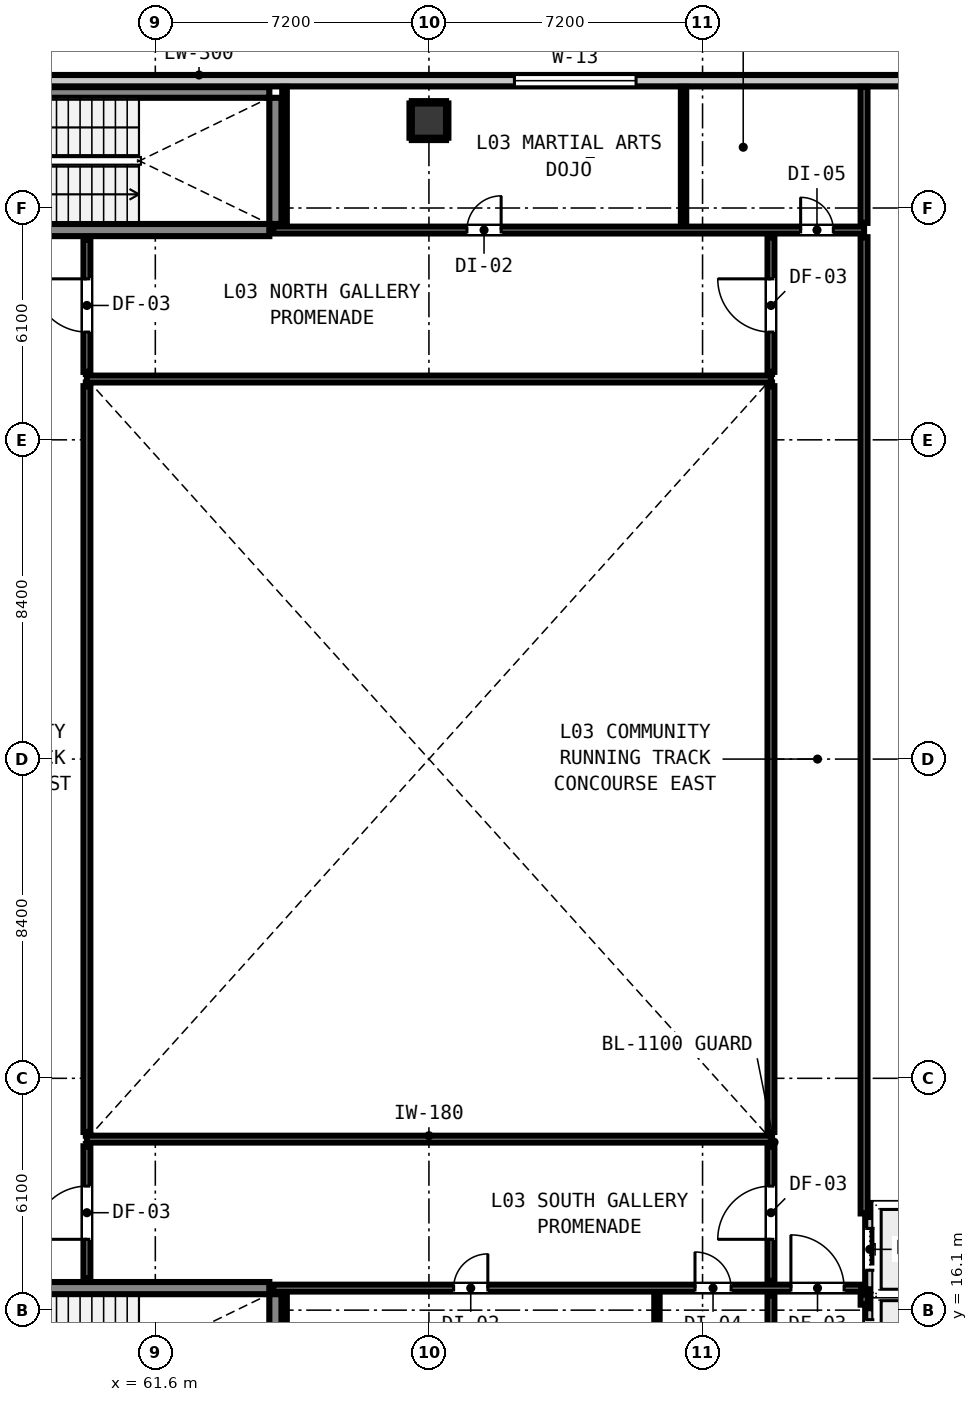
"""IFC4 building model, lengths in metres.
Left out: names, types, materials, properties, quantities, classifications, styles, units other than length and angle.
Written with IfcOpenShell. Run it as: python <this file> out.ifc"""

import sys

from ifc_helpers import new_model, si_unit, direction, frame, frame_2d, origin, origin_2d, place, context, subcontext, project, spatial, rectangle, circle, extrude, element, fill, save


model = new_model("IFC4")
c1 = context("Model", 3, precision=1e-05, world=origin(), true_north=direction((0.0, 1.0)))
c2 = subcontext(c1, "Body", "Model", "MODEL_VIEW")
j1 = project(units=[si_unit("LENGTHUNIT", "METRE"), si_unit("PLANEANGLEUNIT", "RADIAN")], contexts=[c1])
p1 = place(None, origin())
s1 = spatial("IfcSite", under=j1, at=p1, CompositionType="ELEMENT")
p2 = place(p1, origin())
s2 = spatial("IfcBuilding", under=s1, at=p2, CompositionType="ELEMENT")
p3 = place(p2, frame((0.0, 0.0, 13.6)))
s3 = spatial("IfcBuildingStorey", under=s2, at=p3, CompositionType="ELEMENT", Elevation=13.6)
p4 = place(p3, frame((64.76, 13.2, 0.0), z_axis=(0.0, 0.0, 1.0), x_axis=(0.0, 1.0, 0.0)))
e1 = element("IfcWall", 1, at=p4, inside=s3, PredefinedType="SHEAR", context=c2, shape_type="SweptSolid", body=[
    extrude(rectangle(XDim=3.32, YDim=0.32, at=frame_2d((1.66, 0.0))), origin(), (0.0, 0.0, 1.0), 4.2),
])
p5 = place(p3, frame((56.2, 16.68, 0.0), z_axis=(0.0, 0.0, 1.0), x_axis=(1.0, 0.0, 0.0)))
e2 = element("IfcWall", 2, at=p5, inside=s3, PredefinedType="SHEAR", context=c2, shape_type="SweptSolid", body=[
    extrude(rectangle(XDim=8.4, YDim=0.32, at=frame_2d((4.2, 0.0))), origin(), (0.0, 0.0, 1.0), 4.2),
])
p6 = place(p5, frame((0.23, 0.0, 0.0)))
e3 = element("IfcOpeningElement", 3, at=p6, cuts=e2, PredefinedType="OPENING", context=c2, shape_type="SweptSolid", body=[
    extrude(rectangle(XDim=1.1, YDim=2.15, at=frame_2d((0.55, 1.075))), frame((0.0, 0.17, 0.0), z_axis=(0.0, -1.0, 0.0), x_axis=(1.0, 0.0, 0.0)), (0.0, 0.0, 1.0), 0.34),
])
p7 = place(p3, frame((64.76, 44.68, 0.0), z_axis=(0.0, 0.0, 1.0), x_axis=(0.0, 1.0, 0.0)))
e4 = element("IfcWall", 4, at=p7, inside=s3, PredefinedType="SHEAR", context=c2, shape_type="SweptSolid", body=[
    extrude(rectangle(XDim=3.32, YDim=0.32, at=frame_2d((1.66, 0.0))), origin(), (0.0, 0.0, 1.0), 4.2),
])
p8 = place(p3, frame((56.2, 48.14, 0.0), z_axis=(0.0, 0.0, 1.0), x_axis=(1.0, 0.0, 0.0)))
e5 = element("IfcWall", 5, at=p8, inside=s3, PredefinedType="SHEAR", context=c2, shape_type="SweptSolid", body=[
    extrude(rectangle(XDim=8.4, YDim=0.28, at=frame_2d((4.2, 0.0))), origin(), (0.0, 0.0, 1.0), 4.2),
])
p9 = place(p3, frame((56.2, 44.52, 0.0), z_axis=(0.0, 0.0, 1.0), x_axis=(1.0, 0.0, 0.0)))
e6 = element("IfcWall", 6, at=p9, inside=s3, PredefinedType="SHEAR", context=c2, shape_type="SweptSolid", body=[
    extrude(rectangle(XDim=8.4, YDim=0.32, at=frame_2d((4.2, 0.0))), origin(), (0.0, 0.0, 1.0), 4.2),
])
p10 = place(p9, frame((0.23, 0.0, 0.0)))
e7 = element("IfcOpeningElement", 7, at=p10, cuts=e6, PredefinedType="OPENING", context=c2, shape_type="SweptSolid", body=[
    extrude(rectangle(XDim=1.1, YDim=2.15, at=frame_2d((0.55, 1.075))), frame((0.0, 0.17, 0.0), z_axis=(0.0, -1.0, 0.0), x_axis=(1.0, 0.0, 0.0)), (0.0, 0.0, 1.0), 0.34),
])
p11 = place(p3, frame((68.8, 47.4, 0.0), z_axis=(0.0, 0.0, 1.0), x_axis=(1.0, 0.0, 0.0)))
e8 = element("IfcColumn", 8, at=p11, inside=s3, PredefinedType="COLUMN", context=c2, shape_type="SweptSolid", body=[
    extrude(circle(Radius=0.45, at=origin_2d()), origin(), (0.0, 0.0, 1.0), 4.2),
])
p12 = place(p3, frame((54.55, 48.45, 0.0), z_axis=(0.0, 0.0, 1.0), x_axis=(1.0, 0.0, 0.0)))
e9 = element("IfcWall", 9, at=p12, inside=s3, PredefinedType="STANDARD", context=c2, shape_type="SweptSolid", body=[
    extrude(rectangle(XDim=28.5, YDim=0.3, at=frame_2d((14.25, 0.0))), origin(), (0.0, 0.0, 1.0), 3.92),
])
p13 = place(p12, frame((16.5, 0.0, 1.6)))
e10 = element("IfcOpeningElement", 10, at=p13, cuts=e9, PredefinedType="OPENING", context=c2, shape_type="SweptSolid", body=[
    extrude(rectangle(XDim=3.2, YDim=1.4, at=frame_2d((1.6, 0.7))), frame((0.0, 0.16, 0.0), z_axis=(0.0, -1.0, 0.0), x_axis=(1.0, 0.0, 0.0)), (0.0, 0.0, 1.0), 0.32),
])
p14 = place(p3, frame((80.4, 16.4, 0.0), z_axis=(0.0, 0.0, 1.0), x_axis=(1.0, 0.0, 0.0)))
e11 = element("IfcWall", 11, at=p14, inside=s3, PredefinedType="PARTITIONING", context=c2, shape_type="SweptSolid", body=[
    extrude(rectangle(XDim=2.2, YDim=0.24, at=frame_2d((1.1, 0.0))), origin(), (0.0, 0.0, 1.0), 3.78),
])
p15 = place(p3, frame((80.4, 14.448, 0.0), z_axis=(0.0, 0.0, 1.0), x_axis=(0.0, 1.0, 0.0)))
e12 = element("IfcWall", 12, at=p15, inside=s3, PredefinedType="PARTITIONING", context=c2, shape_type="SweptSolid", body=[
    extrude(rectangle(XDim=1.704, YDim=0.24, at=frame_2d((0.852, 0.0))), origin(), (0.0, 0.0, 1.0), 3.78),
])
p16 = place(p15, frame((0.302, 0.0, 0.0)))
e13 = element("IfcOpeningElement", 13, at=p16, cuts=e12, PredefinedType="OPENING", context=c2, shape_type="SweptSolid", body=[
    extrude(rectangle(XDim=1.1, YDim=2.15, at=frame_2d((0.55, 1.075))), frame((0.0, 0.13, 0.0), z_axis=(0.0, -1.0, 0.0), x_axis=(1.0, 0.0, 0.0)), (0.0, 0.0, 1.0), 0.26),
])
p17 = place(p3, frame((80.4, 18.8, 0.0), z_axis=(0.0, 0.0, 1.0), x_axis=(1.0, 0.0, 0.0)))
e14 = element("IfcWall", 14, at=p17, inside=s3, PredefinedType="PARTITIONING", context=c2, shape_type="SweptSolid", body=[
    extrude(rectangle(XDim=2.2, YDim=0.24, at=frame_2d((1.1, 0.0))), origin(), (0.0, 0.0, 1.0), 3.78),
])
p18 = place(p3, frame((80.4, 16.648, 0.0), z_axis=(0.0, 0.0, 1.0), x_axis=(0.0, 1.0, 0.0)))
e15 = element("IfcWall", 15, at=p18, inside=s3, PredefinedType="PARTITIONING", context=c2, shape_type="SweptSolid", body=[
    extrude(rectangle(XDim=1.904, YDim=0.24, at=frame_2d((0.952, 0.0))), origin(), (0.0, 0.0, 1.0), 3.78),
])
p19 = place(p18, frame((0.502, 0.0, 0.0)))
e16 = element("IfcOpeningElement", 16, at=p19, cuts=e15, PredefinedType="OPENING", context=c2, shape_type="SweptSolid", body=[
    extrude(rectangle(XDim=1.1, YDim=2.15, at=frame_2d((0.55, 1.075))), frame((0.0, 0.13, 0.0), z_axis=(0.0, -1.0, 0.0), x_axis=(1.0, 0.0, 0.0)), (0.0, 0.0, 1.0), 0.26),
])
p20 = place(p3, frame((64.7, 16.68, 0.0), z_axis=(0.0, 0.0, 1.0), x_axis=(1.0, 0.0, 0.0)))
e17 = element("IfcWall", 17, at=p20, inside=s3, PredefinedType="PARTITIONING", context=c2, shape_type="SweptSolid", body=[
    extrude(rectangle(XDim=15.482, YDim=0.18, at=frame_2d((7.741, 0.0))), origin(), (0.0, 0.0, 1.0), 3.78),
])
p21 = place(p20, frame((13.625, 0.0, 0.0)))
e18 = element("IfcOpeningElement", 18, at=p21, cuts=e17, PredefinedType="OPENING", context=c2, shape_type="SweptSolid", body=[
    extrude(rectangle(XDim=1.4, YDim=2.15, at=frame_2d((0.7, 1.075))), frame((0.0, 0.1, 0.0), z_axis=(0.0, -1.0, 0.0), x_axis=(1.0, 0.0, 0.0)), (0.0, 0.0, 1.0), 0.2),
])
p22 = place(p20, frame((4.75, 0.0, 0.0)))
e19 = element("IfcOpeningElement", 19, at=p22, cuts=e17, PredefinedType="OPENING", context=c2, shape_type="SweptSolid", body=[
    extrude(rectangle(XDim=0.9, YDim=2.1, at=frame_2d((0.45, 1.05))), frame((0.0, 0.1, 0.0), z_axis=(0.0, -1.0, 0.0), x_axis=(1.0, 0.0, 0.0)), (0.0, 0.0, 1.0), 0.2),
])
p23 = place(p20, frame((11.101, 0.0, 0.0)))
e20 = element("IfcOpeningElement", 20, at=p23, cuts=e17, PredefinedType="OPENING", context=c2, shape_type="SweptSolid", body=[
    extrude(rectangle(XDim=0.95, YDim=2.1, at=frame_2d((0.475, 1.05))), frame((0.0, 0.1, 0.0), z_axis=(0.0, -1.0, 0.0), x_axis=(1.0, 0.0, 0.0)), (0.0, 0.0, 1.0), 0.2),
])
for number, where, z_axis, x_axis in (
    (21, (59.8, 20.6, 0.0), (0.0, 0.0, 1.0), (1.0, 0.0, 0.0)),
    (22, (59.8, 40.6, 0.0), (0.0, 0.0, 1.0), (1.0, 0.0, 0.0)),
):
    element("IfcWall", number, at=place(p3, frame(where, z_axis=z_axis, x_axis=x_axis)), inside=s3, PredefinedType="PARTITIONING", context=c2, shape_type="SweptSolid", body=[
        extrude(rectangle(XDim=18.0, YDim=0.18, at=frame_2d((9.0, 0.0))), origin(), (0.0, 0.0, 1.0), 3.78),
    ])
p24 = place(p3, frame((64.7, 44.52, 0.0), z_axis=(0.0, 0.0, 1.0), x_axis=(1.0, 0.0, 0.0)))
e23 = element("IfcWall", 23, at=p24, inside=s3, PredefinedType="PARTITIONING", context=c2, shape_type="SweptSolid", body=[
    extrude(rectangle(XDim=15.55, YDim=0.18, at=frame_2d((7.775, 0.0))), origin(), (0.0, 0.0, 1.0), 3.78),
])
p25 = place(p24, frame((5.1, 0.0, 0.0)))
e24 = element("IfcOpeningElement", 24, at=p25, cuts=e23, PredefinedType="OPENING", context=c2, shape_type="SweptSolid", body=[
    extrude(rectangle(XDim=0.9, YDim=2.1, at=frame_2d((0.45, 1.05))), frame((0.0, 0.1, 0.0), z_axis=(0.0, -1.0, 0.0), x_axis=(1.0, 0.0, 0.0)), (0.0, 0.0, 1.0), 0.2),
])
p26 = place(p24, frame((13.881, 0.0, 0.0)))
e25 = element("IfcOpeningElement", 25, at=p26, cuts=e23, PredefinedType="OPENING", context=c2, shape_type="SweptSolid", body=[
    extrude(rectangle(XDim=0.86, YDim=2.02, at=frame_2d((0.43, 1.01))), frame((0.0, 0.1, 0.0), z_axis=(0.0, -1.0, 0.0), x_axis=(1.0, 0.0, 0.0)), (0.0, 0.0, 1.0), 0.2),
])
p27 = place(p3, frame((59.8, 16.94, 0.0), z_axis=(0.0, 0.0, 1.0), x_axis=(0.0, 1.0, 0.0)))
e26 = element("IfcWall", 26, at=p27, inside=s3, PredefinedType="PARTITIONING", context=c2, shape_type="SweptSolid", body=[
    extrude(rectangle(XDim=3.472, YDim=0.18, at=frame_2d((1.736, 0.0))), origin(), (0.0, 0.0, 1.0), 3.78),
])
p28 = place(p27, frame((1.024, 0.0, 0.0)))
e27 = element("IfcOpeningElement", 27, at=p28, cuts=e26, PredefinedType="OPENING", context=c2, shape_type="SweptSolid", body=[
    extrude(rectangle(XDim=1.4, YDim=2.15, at=frame_2d((0.7, 1.075))), frame((0.0, 0.1, 0.0), z_axis=(0.0, -1.0, 0.0), x_axis=(1.0, 0.0, 0.0)), (0.0, 0.0, 1.0), 0.2),
])
p29 = place(p3, frame((59.8, 20.788, 0.0), z_axis=(0.0, 0.0, 1.0), x_axis=(0.0, 1.0, 0.0)))
e28 = element("IfcWall", 28, at=p29, inside=s3, PredefinedType="PARTITIONING", context=c2, shape_type="SweptSolid", body=[
    extrude(rectangle(XDim=19.624, YDim=0.18, at=frame_2d((9.812, 0.0))), origin(), (0.0, 0.0, 1.0), 3.78),
])
p30 = place(p3, frame((59.8, 40.788, 0.0), z_axis=(0.0, 0.0, 1.0), x_axis=(0.0, 1.0, 0.0)))
e29 = element("IfcWall", 29, at=p30, inside=s3, PredefinedType="PARTITIONING", context=c2, shape_type="SweptSolid", body=[
    extrude(rectangle(XDim=3.472, YDim=0.18, at=frame_2d((1.736, 0.0))), origin(), (0.0, 0.0, 1.0), 3.78),
])
p31 = place(p30, frame((1.048, 0.0, 0.0)))
e30 = element("IfcOpeningElement", 30, at=p31, cuts=e29, PredefinedType="OPENING", context=c2, shape_type="SweptSolid", body=[
    extrude(rectangle(XDim=1.4, YDim=2.15, at=frame_2d((0.7, 1.075))), frame((0.0, 0.1, 0.0), z_axis=(0.0, -1.0, 0.0), x_axis=(1.0, 0.0, 0.0)), (0.0, 0.0, 1.0), 0.2),
])
p32 = place(p3, frame((77.8, 12.912, 0.0), z_axis=(0.0, 0.0, 1.0), x_axis=(0.0, 1.0, 0.0)))
e31 = element("IfcWall", 31, at=p32, inside=s3, PredefinedType="PARTITIONING", context=c2, shape_type="SweptSolid", body=[
    extrude(rectangle(XDim=3.58, YDim=0.18, at=frame_2d((1.79, 0.0))), origin(), (0.0, 0.0, 1.0), 3.78),
])
p33 = place(p3, frame((77.8, 16.868, 0.0), z_axis=(0.0, 0.0, 1.0), x_axis=(0.0, 1.0, 0.0)))
e32 = element("IfcWall", 32, at=p33, inside=s3, PredefinedType="PARTITIONING", context=c2, shape_type="SweptSolid", body=[
    extrude(rectangle(XDim=3.544, YDim=0.18, at=frame_2d((1.772, 0.0))), origin(), (0.0, 0.0, 1.0), 3.78),
])
p34 = place(p33, frame((1.096, 0.0, 0.0)))
e33 = element("IfcOpeningElement", 33, at=p34, cuts=e32, PredefinedType="OPENING", context=c2, shape_type="SweptSolid", body=[
    extrude(rectangle(XDim=1.4, YDim=2.15, at=frame_2d((0.7, 1.075))), frame((0.0, 0.1, 0.0), z_axis=(0.0, -1.0, 0.0), x_axis=(1.0, 0.0, 0.0)), (0.0, 0.0, 1.0), 0.2),
])
p35 = place(p3, frame((77.8, 20.788, 0.0), z_axis=(0.0, 0.0, 1.0), x_axis=(0.0, 1.0, 0.0)))
e34 = element("IfcWall", 34, at=p35, inside=s3, PredefinedType="PARTITIONING", context=c2, shape_type="SweptSolid", body=[
    extrude(rectangle(XDim=19.624, YDim=0.18, at=frame_2d((9.812, 0.0))), origin(), (0.0, 0.0, 1.0), 3.78),
])
p36 = place(p3, frame((77.8, 40.788, 0.0), z_axis=(0.0, 0.0, 1.0), x_axis=(0.0, 1.0, 0.0)))
e35 = element("IfcWall", 35, at=p36, inside=s3, PredefinedType="PARTITIONING", context=c2, shape_type="SweptSolid", body=[
    extrude(rectangle(XDim=3.544, YDim=0.18, at=frame_2d((1.772, 0.0))), origin(), (0.0, 0.0, 1.0), 3.78),
])
p37 = place(p36, frame((1.048, 0.0, 0.0)))
e36 = element("IfcOpeningElement", 36, at=p37, cuts=e35, PredefinedType="OPENING", context=c2, shape_type="SweptSolid", body=[
    extrude(rectangle(XDim=1.4, YDim=2.15, at=frame_2d((0.7, 1.075))), frame((0.0, 0.1, 0.0), z_axis=(0.0, -1.0, 0.0), x_axis=(1.0, 0.0, 0.0)), (0.0, 0.0, 1.0), 0.2),
])
p38 = place(p3, frame((80.25, 16.245, 0.0), z_axis=(0.0, 0.0, 1.0), x_axis=(0.0, 1.0, 0.0)))
e37 = element("IfcWall", 37, at=p38, inside=s3, PredefinedType="PARTITIONING", context=c2, shape_type="SweptSolid", body=[
    extrude(rectangle(XDim=0.275, YDim=0.18, at=frame_2d((0.137, 0.0))), origin(), (0.0, 0.0, 1.0), 3.78),
])
p39 = place(p3, frame((80.25, 18.645, 0.0), z_axis=(0.0, 0.0, 1.0), x_axis=(0.0, 1.0, 0.0)))
e38 = element("IfcWall", 38, at=p39, inside=s3, PredefinedType="PARTITIONING", context=c2, shape_type="SweptSolid", body=[
    extrude(rectangle(XDim=25.687, YDim=0.18, at=frame_2d((12.844, 0.0))), origin(), (0.0, 0.0, 1.0), 3.78),
])
p40 = place(p3, frame((80.25, 44.708, 0.0), z_axis=(0.0, 0.0, 1.0), x_axis=(0.0, 1.0, 0.0)))
e39 = element("IfcWall", 39, at=p40, inside=s3, PredefinedType="PARTITIONING", context=c2, shape_type="SweptSolid", body=[
    extrude(rectangle(XDim=3.58, YDim=0.18, at=frame_2d((1.79, 0.0))), origin(), (0.0, 0.0, 1.0), 3.78),
])
p41 = place(p3, frame((74.8, 12.912, 0.0), z_axis=(0.0, 0.0, 1.0), x_axis=(0.0, 1.0, 0.0)))
e40 = element("IfcWall", 40, at=p41, inside=s3, PredefinedType="PARTITIONING", context=c2, shape_type="SweptSolid", body=[
    extrude(rectangle(XDim=3.6, YDim=0.14, at=frame_2d((1.8, 0.0))), origin(), (0.0, 0.0, 1.0), 3.78),
])
p42 = place(p3, frame((75.5, 44.688, 0.0), z_axis=(0.0, 0.0, 1.0), x_axis=(0.0, 1.0, 0.0)))
e41 = element("IfcWall", 41, at=p42, inside=s3, PredefinedType="PARTITIONING", context=c2, shape_type="SweptSolid", body=[
    extrude(rectangle(XDim=3.6, YDim=0.14, at=frame_2d((1.8, 0.0))), origin(), (0.0, 0.0, 1.0), 3.78),
])
p43 = place(p3, frame((65.0, 12.912, 0.0), z_axis=(0.0, 0.0, 1.0), x_axis=(0.0, 1.0, 0.0)))
e42 = element("IfcWall", 42, at=p43, inside=s3, PredefinedType="PARTITIONING", context=c2, shape_type="SweptSolid", body=[
    extrude(rectangle(XDim=3.61, YDim=0.12, at=frame_2d((1.805, 0.0))), origin(), (0.0, 0.0, 1.0), 3.78),
])
p44 = place(p3, frame((65.0, 44.678, 0.0), z_axis=(0.0, 0.0, 1.0), x_axis=(0.0, 1.0, 0.0)))
e43 = element("IfcWall", 43, at=p44, inside=s3, PredefinedType="PARTITIONING", context=c2, shape_type="SweptSolid", body=[
    extrude(rectangle(XDim=3.61, YDim=0.12, at=frame_2d((1.805, 0.0))), origin(), (0.0, 0.0, 1.0), 3.78),
])
for number, where, z_axis, x_axis in (
    (44, (68.35, 46.918, 0.0), (0.0, 0.0, 1.0), (1.0, 0.0, 0.0)),
    (45, (68.35, 47.882, 0.0), (0.0, 0.0, 1.0), (1.0, 0.0, 0.0)),
):
    element("IfcWall", number, at=place(p3, frame(where, z_axis=z_axis, x_axis=x_axis)), inside=s3, PredefinedType="PARTITIONING", context=c2, shape_type="SweptSolid", body=[
        extrude(rectangle(XDim=0.9, YDim=0.06, at=frame_2d((0.45, 0.0))), origin(), (0.0, 0.0, 1.0), 1.45),
    ])
for number, where, z_axis, x_axis in (
    (46, (68.318, 46.95, 0.0), (0.0, 0.0, 1.0), (0.0, 1.0, 0.0)),
    (47, (69.282, 46.95, 0.0), (0.0, 0.0, 1.0), (0.0, 1.0, 0.0)),
):
    element("IfcWall", number, at=place(p3, frame(where, z_axis=z_axis, x_axis=x_axis)), inside=s3, PredefinedType="PARTITIONING", context=c2, shape_type="SweptSolid", body=[
        extrude(rectangle(XDim=0.9, YDim=0.06, at=frame_2d((0.45, 0.0))), origin(), (0.0, 0.0, 1.0), 1.45),
    ])
p45 = place(p13, origin())
e48 = element("IfcWindow", 48, at=p45, inside=s3, PartitioningType="SINGLE_PANEL", PredefinedType="LIGHTDOME", context=c2, shape_type="SweptSolid", body=[
    extrude(rectangle(XDim=3.2, YDim=1.4, at=frame_2d((1.6, 0.7))), frame((0.0, 0.03, 0.0), z_axis=(0.0, -1.0, 0.0), x_axis=(1.0, 0.0, 0.0)), (0.0, 0.0, 1.0), 0.06),
])
fill(e10, e48)
p46 = place(p16, origin())
e49 = element("IfcDoor", 49, at=p46, inside=s3, OperationType="SLIDING_TO_LEFT", PredefinedType="DOOR", context=c2, shape_type="SweptSolid", body=[
    extrude(rectangle(XDim=1.1, YDim=2.15, at=frame_2d((0.55, 1.075))), frame((0.0, 0.025, 0.0), z_axis=(0.0, -1.0, 0.0), x_axis=(1.0, 0.0, 0.0)), (0.0, 0.0, 1.0), 0.05),
])
fill(e13, e49)
p47 = place(p19, origin())
e50 = element("IfcDoor", 50, at=p47, inside=s3, OperationType="SLIDING_TO_RIGHT", PredefinedType="DOOR", context=c2, shape_type="SweptSolid", body=[
    extrude(rectangle(XDim=1.1, YDim=2.15, at=frame_2d((0.55, 1.075))), frame((0.0, 0.025, 0.0), z_axis=(0.0, -1.0, 0.0), x_axis=(1.0, 0.0, 0.0)), (0.0, 0.0, 1.0), 0.05),
])
fill(e16, e50)
p48 = place(p28, origin())
e51 = element("IfcDoor", 51, at=p48, inside=s3, OperationType="SINGLE_SWING_LEFT", PredefinedType="DOOR", context=c2, shape_type="SweptSolid", body=[
    extrude(rectangle(XDim=1.4, YDim=2.15, at=frame_2d((0.7, 1.075))), frame((0.0, 0.025, 0.0), z_axis=(0.0, -1.0, 0.0), x_axis=(1.0, 0.0, 0.0)), (0.0, 0.0, 1.0), 0.05),
])
fill(e27, e51)
p49 = place(p31, origin())
e52 = element("IfcDoor", 52, at=p49, inside=s3, OperationType="SINGLE_SWING_RIGHT", PredefinedType="DOOR", context=c2, shape_type="SweptSolid", body=[
    extrude(rectangle(XDim=1.4, YDim=2.15, at=frame_2d((0.7, 1.075))), frame((0.0, 0.025, 0.0), z_axis=(0.0, -1.0, 0.0), x_axis=(1.0, 0.0, 0.0)), (0.0, 0.0, 1.0), 0.05),
])
fill(e30, e52)
p50 = place(p34, origin())
e53 = element("IfcDoor", 53, at=p50, inside=s3, OperationType="SINGLE_SWING_LEFT", PredefinedType="DOOR", context=c2, shape_type="SweptSolid", body=[
    extrude(rectangle(XDim=1.4, YDim=2.15, at=frame_2d((0.7, 1.075))), frame((0.0, 0.025, 0.0), z_axis=(0.0, -1.0, 0.0), x_axis=(1.0, 0.0, 0.0)), (0.0, 0.0, 1.0), 0.05),
])
fill(e33, e53)
p51 = place(p37, origin())
e54 = element("IfcDoor", 54, at=p51, inside=s3, OperationType="SINGLE_SWING_RIGHT", PredefinedType="DOOR", context=c2, shape_type="SweptSolid", body=[
    extrude(rectangle(XDim=1.4, YDim=2.15, at=frame_2d((0.7, 1.075))), frame((0.0, 0.025, 0.0), z_axis=(0.0, -1.0, 0.0), x_axis=(1.0, 0.0, 0.0)), (0.0, 0.0, 1.0), 0.05),
])
fill(e36, e54)
p52 = place(p21, origin())
e55 = element("IfcDoor", 55, at=p52, inside=s3, OperationType="SINGLE_SWING_LEFT", PredefinedType="DOOR", context=c2, shape_type="SweptSolid", body=[
    extrude(rectangle(XDim=1.4, YDim=2.15, at=frame_2d((0.7, 1.075))), frame((0.0, 0.025, 0.0), z_axis=(0.0, -1.0, 0.0), x_axis=(1.0, 0.0, 0.0)), (0.0, 0.0, 1.0), 0.05),
])
fill(e18, e55)
p53 = place(p22, origin())
e56 = element("IfcDoor", 56, at=p53, inside=s3, OperationType="SINGLE_SWING_RIGHT", PredefinedType="DOOR", context=c2, shape_type="SweptSolid", body=[
    extrude(rectangle(XDim=0.9, YDim=2.1, at=frame_2d((0.45, 1.05))), frame((0.0, 0.025, 0.0), z_axis=(0.0, -1.0, 0.0), x_axis=(1.0, 0.0, 0.0)), (0.0, 0.0, 1.0), 0.05),
])
fill(e19, e56)
p54 = place(p23, origin())
e57 = element("IfcDoor", 57, at=p54, inside=s3, OperationType="SINGLE_SWING_LEFT", PredefinedType="DOOR", context=c2, shape_type="SweptSolid", body=[
    extrude(rectangle(XDim=0.95, YDim=2.1, at=frame_2d((0.475, 1.05))), frame((0.0, 0.025, 0.0), z_axis=(0.0, -1.0, 0.0), x_axis=(1.0, 0.0, 0.0)), (0.0, 0.0, 1.0), 0.05),
])
fill(e20, e57)
p55 = place(p25, origin())
e58 = element("IfcDoor", 58, at=p55, inside=s3, OperationType="SINGLE_SWING_RIGHT", PredefinedType="DOOR", context=c2, shape_type="SweptSolid", body=[
    extrude(rectangle(XDim=0.9, YDim=2.1, at=frame_2d((0.45, 1.05))), frame((0.0, 0.025, 0.0), z_axis=(0.0, -1.0, 0.0), x_axis=(1.0, 0.0, 0.0)), (0.0, 0.0, 1.0), 0.05),
])
fill(e24, e58)
p56 = place(p26, origin())
e59 = element("IfcDoor", 59, at=p56, inside=s3, OperationType="SINGLE_SWING_LEFT", PredefinedType="DOOR", context=c2, shape_type="SweptSolid", body=[
    extrude(rectangle(XDim=0.86, YDim=2.02, at=frame_2d((0.43, 1.01))), frame((0.0, 0.025, 0.0), z_axis=(0.0, -1.0, 0.0), x_axis=(1.0, 0.0, 0.0)), (0.0, 0.0, 1.0), 0.05),
])
fill(e25, e59)
save(model, sys.argv[1])
